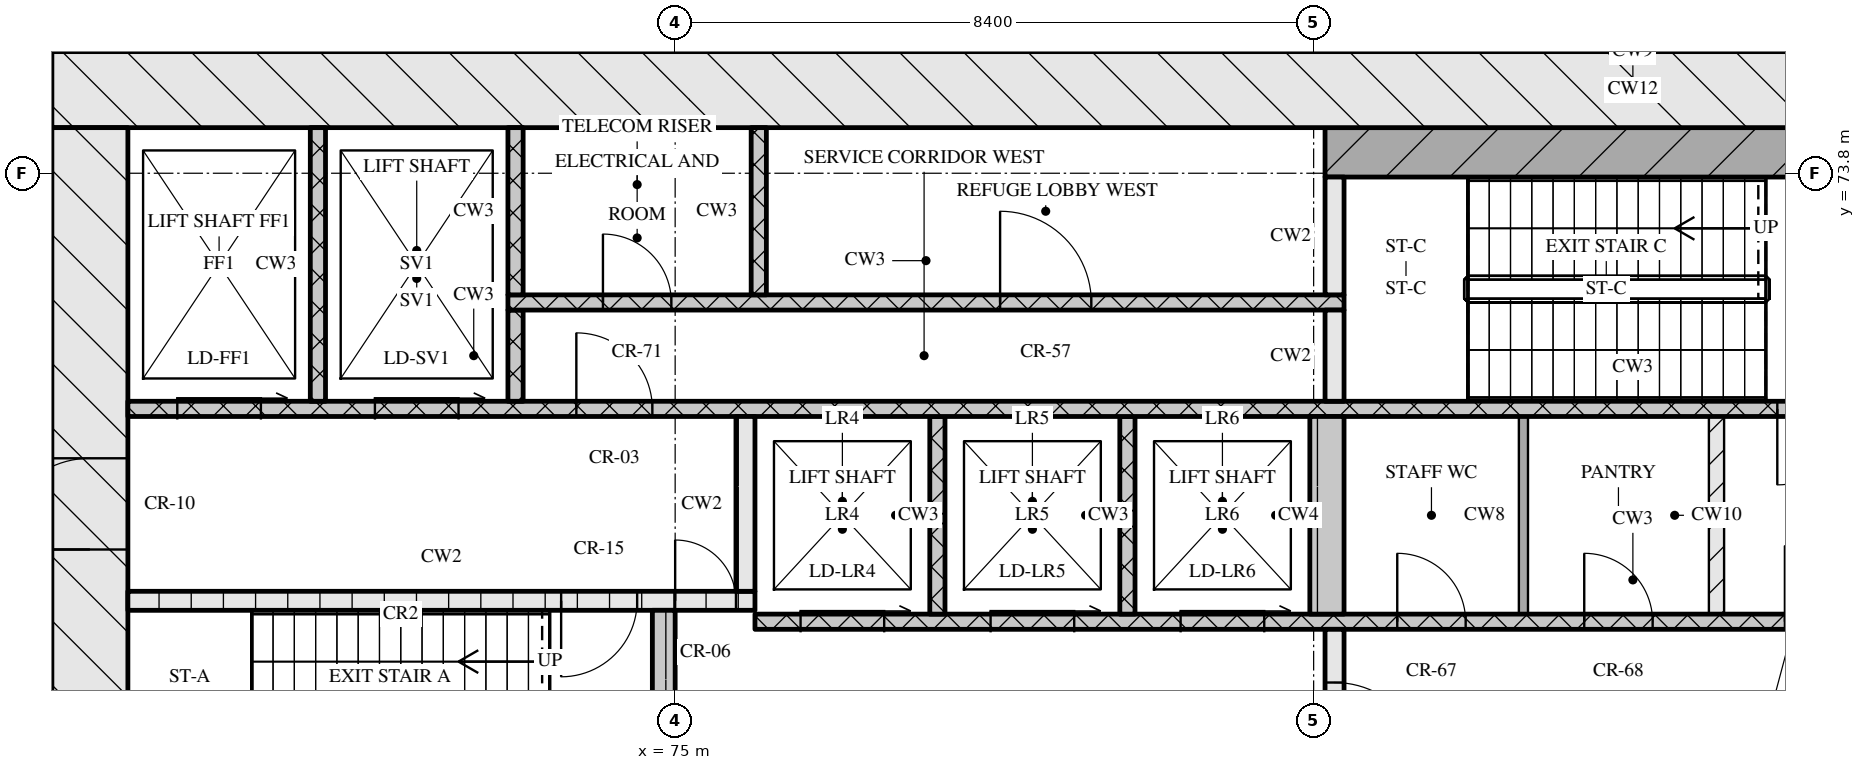
"""IFC4 building model, lengths in metres.
Left out: names, types, materials, properties, quantities, classifications, styles, units other than length and angle.
Written with IfcOpenShell. Run it as: python <this file> out.ifc"""

import sys

from ifc_helpers import new_model, si_unit, direction, frame, frame_2d, origin, place, context, subcontext, project, spatial, rectangle, extrude, element, fill, save


model = new_model("IFC4")
c1 = context("Model", 3, precision=1e-05, world=origin(), true_north=direction((0.0, 1.0)))
c2 = subcontext(c1, "Body", "Model", "MODEL_VIEW")
j1 = project(units=[si_unit("LENGTHUNIT", "METRE"), si_unit("PLANEANGLEUNIT", "RADIAN")], contexts=[c1])
p1 = place(None, origin())
s1 = spatial("IfcSite", under=j1, at=p1, CompositionType="ELEMENT")
p2 = place(p1, origin())
s2 = spatial("IfcBuilding", under=s1, at=p2, CompositionType="ELEMENT")
p3 = place(p2, frame((0.0, 0.0, 84.0)))
s3 = spatial("IfcBuildingStorey", under=s2, at=p3, CompositionType="ELEMENT", Elevation=84.0)
p4 = place(p3, frame((66.8, 74.9, 0.0), z_axis=(0.0, 0.0, 1.0), x_axis=(1.0, 0.0, 0.0)))
e1 = element("IfcWall", 1, at=p4, inside=s3, PredefinedType="SOLIDWALL", context=c2, shape_type="SweptSolid", body=[
    extrude(rectangle(XDim=41.6, YDim=1.0, at=frame_2d((20.8, 0.0))), origin(), (0.0, 0.0, 1.0), 10.97),
])
p5 = place(p3, frame((67.3, 62.4, 0.0), z_axis=(0.0, 0.0, 1.0), x_axis=(0.0, 1.0, 0.0)))
e2 = element("IfcWall", 2, at=p5, inside=s3, PredefinedType="SOLIDWALL", context=c2, shape_type="SweptSolid", body=[
    extrude(rectangle(XDim=12.0, YDim=1.0, at=frame_2d((6.0, 0.0))), origin(), (0.0, 0.0, 1.0), 10.97),
])
p6 = place(p5, frame((6.45, 0.0, 0.0)))
e3 = element("IfcOpeningElement", 3, at=p6, cuts=e2, PredefinedType="OPENING", context=c2, shape_type="SweptSolid", body=[
    extrude(rectangle(XDim=1.2, YDim=2.1, at=frame_2d((0.6, 1.05))), frame((0.0, 0.51, 0.0), z_axis=(0.0, -1.0, 0.0), x_axis=(1.0, 0.0, 0.0)), (0.0, 0.0, 1.0), 1.02),
])
p7 = place(p3, frame((74.85, 65.2, 0.0), z_axis=(0.0, 0.0, 1.0), x_axis=(0.0, 1.0, 0.0)))
e4 = element("IfcWall", 4, at=p7, inside=s3, PredefinedType="SOLIDWALL", context=c2, shape_type="SweptSolid", body=[
    extrude(rectangle(XDim=2.85, YDim=0.3, at=frame_2d((1.425, 0.0))), origin(), (0.0, 0.0, 1.0), 10.97),
])
p8 = place(p3, frame((83.675, 65.2, 0.0), z_axis=(0.0, 0.0, 1.0), x_axis=(0.0, 1.0, 0.0)))
e5 = element("IfcWall", 5, at=p8, inside=s3, PredefinedType="SOLIDWALL", context=c2, shape_type="SweptSolid", body=[
    extrude(rectangle(XDim=2.6, YDim=0.25, at=frame_2d((1.3, 0.0))), origin(), (0.0, 0.0, 1.0), 10.97),
])
p9 = place(p8, frame((0.7, 0.0, 0.0)))
e6 = element("IfcOpeningElement", 6, at=p9, cuts=e5, PredefinedType="OPENING", context=c2, shape_type="SweptSolid", body=[
    extrude(rectangle(XDim=1.2, YDim=2.1, at=frame_2d((0.6, 1.05))), frame((0.0, 0.135, 0.0), z_axis=(0.0, -1.0, 0.0), x_axis=(1.0, 0.0, 0.0)), (0.0, 0.0, 1.0), 0.27),
])
p10 = place(p3, frame((76.05, 67.9, 0.0), z_axis=(0.0, 0.0, 1.0), x_axis=(1.0, 0.0, 0.0)))
e7 = element("IfcWall", 7, at=p10, inside=s3, PredefinedType="SOLIDWALL", context=c2, shape_type="SweptSolid", body=[
    extrude(rectangle(XDim=23.1, YDim=0.2, at=frame_2d((11.55, 0.0))), origin(), (0.0, 0.0, 1.0), 10.97),
])
p11 = place(p10, frame((0.6, 0.0, 0.0)))
e8 = element("IfcOpeningElement", 8, at=p11, cuts=e7, PredefinedType="OPENING", context=c2, shape_type="SweptSolid", body=[
    extrude(rectangle(XDim=1.1, YDim=2.1, at=frame_2d((0.55, 1.05))), frame((0.0, 0.11, 0.0), z_axis=(0.0, -1.0, 0.0), x_axis=(1.0, 0.0, 0.0)), (0.0, 0.0, 1.0), 0.22),
])
p12 = place(p10, frame((3.1, 0.0, 0.0)))
e9 = element("IfcOpeningElement", 9, at=p12, cuts=e7, PredefinedType="OPENING", context=c2, shape_type="SweptSolid", body=[
    extrude(rectangle(XDim=1.1, YDim=2.1, at=frame_2d((0.55, 1.05))), frame((0.0, 0.11, 0.0), z_axis=(0.0, -1.0, 0.0), x_axis=(1.0, 0.0, 0.0)), (0.0, 0.0, 1.0), 0.22),
])
p13 = place(p10, frame((5.6, 0.0, 0.0)))
e10 = element("IfcOpeningElement", 10, at=p13, cuts=e7, PredefinedType="OPENING", context=c2, shape_type="SweptSolid", body=[
    extrude(rectangle(XDim=1.1, YDim=2.1, at=frame_2d((0.55, 1.05))), frame((0.0, 0.11, 0.0), z_axis=(0.0, -1.0, 0.0), x_axis=(1.0, 0.0, 0.0)), (0.0, 0.0, 1.0), 0.22),
])
p14 = place(p10, frame((8.45, 0.0, 0.0)))
e11 = element("IfcOpeningElement", 11, at=p14, cuts=e7, PredefinedType="OPENING", context=c2, shape_type="SweptSolid", body=[
    extrude(rectangle(XDim=0.9, YDim=2.1, at=frame_2d((0.45, 1.05))), frame((0.0, 0.11, 0.0), z_axis=(0.0, -1.0, 0.0), x_axis=(1.0, 0.0, 0.0)), (0.0, 0.0, 1.0), 0.22),
])
p15 = place(p10, frame((10.91, 0.0, 0.0)))
e12 = element("IfcOpeningElement", 12, at=p15, cuts=e7, PredefinedType="OPENING", context=c2, shape_type="SweptSolid", body=[
    extrude(rectangle(XDim=0.9, YDim=2.1, at=frame_2d((0.45, 1.05))), frame((0.0, 0.11, 0.0), z_axis=(0.0, -1.0, 0.0), x_axis=(1.0, 0.0, 0.0)), (0.0, 0.0, 1.0), 0.22),
])
p16 = place(p10, frame((13.55, 0.0, 0.0)))
e13 = element("IfcOpeningElement", 13, at=p16, cuts=e7, PredefinedType="OPENING", context=c2, shape_type="SweptSolid", body=[
    extrude(rectangle(XDim=1.0, YDim=2.1, at=frame_2d((0.5, 1.05))), frame((0.0, 0.11, 0.0), z_axis=(0.0, -1.0, 0.0), x_axis=(1.0, 0.0, 0.0)), (0.0, 0.0, 1.0), 0.22),
])
for number, where, z_axis, x_axis in (
    (14, (78.45, 68.0, 0.0), (0.0, 0.0, 1.0), (0.0, 1.0, 0.0)),
    (15, (80.95, 68.0, 0.0), (0.0, 0.0, 1.0), (0.0, 1.0, 0.0)),
):
    element("IfcWall", number, at=place(p3, frame(where, z_axis=z_axis, x_axis=x_axis)), inside=s3, PredefinedType="SOLIDWALL", context=c2, shape_type="SweptSolid", body=[
        extrude(rectangle(XDim=2.6, YDim=0.2, at=frame_2d((1.3, 0.0))), origin(), (0.0, 0.0, 1.0), 10.97),
    ])
p17 = place(p3, frame((83.575, 68.0, 0.0), z_axis=(0.0, 0.0, 1.0), x_axis=(0.0, 1.0, 0.0)))
e16 = element("IfcWall", 16, at=p17, inside=s3, PredefinedType="SOLIDWALL", context=c2, shape_type="SweptSolid", body=[
    extrude(rectangle(XDim=2.6, YDim=0.45, at=frame_2d((1.3, 0.0))), origin(), (0.0, 0.0, 1.0), 10.97),
])
p18 = place(p3, frame((86.16, 68.0, 0.0), z_axis=(0.0, 0.0, 1.0), x_axis=(0.0, 1.0, 0.0)))
e17 = element("IfcWall", 17, at=p18, inside=s3, PredefinedType="PARTITIONING", context=c2, shape_type="SweptSolid", body=[
    extrude(rectangle(XDim=2.6, YDim=0.12, at=frame_2d((1.3, 0.0))), origin(), (0.0, 0.0, 1.0), 10.97),
])
p19 = place(p3, frame((88.7, 68.0, 0.0), z_axis=(0.0, 0.0, 1.0), x_axis=(0.0, 1.0, 0.0)))
e18 = element("IfcWall", 18, at=p19, inside=s3, PredefinedType="PARTITIONING", context=c2, shape_type="SweptSolid", body=[
    extrude(rectangle(XDim=2.6, YDim=0.2, at=frame_2d((1.3, 0.0))), origin(), (0.0, 0.0, 1.0), 10.97),
])
p20 = place(p3, frame((67.8, 68.175, 0.0), z_axis=(0.0, 0.0, 1.0), x_axis=(1.0, 0.0, 0.0)))
e19 = element("IfcWall", 19, at=p20, inside=s3, PredefinedType="SOLIDWALL", context=c2, shape_type="SweptSolid", body=[
    extrude(rectangle(XDim=8.25, YDim=0.25, at=frame_2d((4.125, 0.0))), origin(), (0.0, 0.0, 1.0), 10.97),
])
p21 = place(p20, frame((5.7, 0.0, 0.0)))
e20 = element("IfcOpeningElement", 20, at=p21, cuts=e19, PredefinedType="OPENING", context=c2, shape_type="SweptSolid", body=[
    extrude(rectangle(XDim=1.0, YDim=2.1, at=frame_2d((0.5, 1.05))), frame((0.0, 0.135, 0.0), z_axis=(0.0, -1.0, 0.0), x_axis=(1.0, 0.0, 0.0)), (0.0, 0.0, 1.0), 0.27),
])
p22 = place(p20, frame((7.2, 0.0, 0.0)))
e21 = element("IfcOpeningElement", 21, at=p22, cuts=e19, PredefinedType="OPENING", context=c2, shape_type="SweptSolid", body=[
    extrude(rectangle(XDim=0.8, YDim=2.1, at=frame_2d((0.4, 1.05))), frame((0.0, 0.135, 0.0), z_axis=(0.0, -1.0, 0.0), x_axis=(1.0, 0.0, 0.0)), (0.0, 0.0, 1.0), 0.27),
])
p23 = place(p3, frame((75.925, 68.3, 0.0), z_axis=(0.0, 0.0, 1.0), x_axis=(0.0, 1.0, 0.0)))
e22 = element("IfcWall", 22, at=p23, inside=s3, PredefinedType="SOLIDWALL", context=c2, shape_type="SweptSolid", body=[
    extrude(rectangle(XDim=2.3, YDim=0.25, at=frame_2d((1.15, 0.0))), origin(), (0.0, 0.0, 1.0), 10.97),
])
p24 = place(p3, frame((67.8, 70.7, 0.0), z_axis=(0.0, 0.0, 1.0), x_axis=(1.0, 0.0, 0.0)))
e23 = element("IfcWall", 23, at=p24, inside=s3, PredefinedType="SOLIDWALL", context=c2, shape_type="SweptSolid", body=[
    extrude(rectangle(XDim=39.6, YDim=0.2, at=frame_2d((19.8, 0.0))), origin(), (0.0, 0.0, 1.0), 10.97),
])
p25 = place(p24, frame((0.65, 0.0, 0.0)))
e24 = element("IfcOpeningElement", 24, at=p25, cuts=e23, PredefinedType="OPENING", context=c2, shape_type="SweptSolid", body=[
    extrude(rectangle(XDim=1.1, YDim=2.1, at=frame_2d((0.55, 1.05))), frame((0.0, 0.11, 0.0), z_axis=(0.0, -1.0, 0.0), x_axis=(1.0, 0.0, 0.0)), (0.0, 0.0, 1.0), 0.22),
])
p26 = place(p24, frame((3.25, 0.0, 0.0)))
e25 = element("IfcOpeningElement", 25, at=p26, cuts=e23, PredefinedType="OPENING", context=c2, shape_type="SweptSolid", body=[
    extrude(rectangle(XDim=1.1, YDim=2.1, at=frame_2d((0.55, 1.05))), frame((0.0, 0.11, 0.0), z_axis=(0.0, -1.0, 0.0), x_axis=(1.0, 0.0, 0.0)), (0.0, 0.0, 1.0), 0.22),
])
p27 = place(p24, frame((5.9, 0.0, 0.0)))
e26 = element("IfcOpeningElement", 26, at=p27, cuts=e23, PredefinedType="OPENING", context=c2, shape_type="SweptSolid", body=[
    extrude(rectangle(XDim=1.0, YDim=2.1, at=frame_2d((0.5, 1.05))), frame((0.0, 0.11, 0.0), z_axis=(0.0, -1.0, 0.0), x_axis=(1.0, 0.0, 0.0)), (0.0, 0.0, 1.0), 0.22),
])
p28 = place(p24, frame((21.7, 0.0, 0.0)))
e27 = element("IfcOpeningElement", 27, at=p28, cuts=e23, PredefinedType="OPENING", context=c2, shape_type="SweptSolid", body=[
    extrude(rectangle(XDim=1.0, YDim=2.1, at=frame_2d((0.5, 1.05))), frame((0.0, 0.11, 0.0), z_axis=(0.0, -1.0, 0.0), x_axis=(1.0, 0.0, 0.0)), (0.0, 0.0, 1.0), 0.22),
])
p29 = place(p24, frame((32.7, 0.0, 0.0)))
e28 = element("IfcOpeningElement", 28, at=p29, cuts=e23, PredefinedType="OPENING", context=c2, shape_type="SweptSolid", body=[
    extrude(rectangle(XDim=1.0, YDim=2.1, at=frame_2d((0.5, 1.05))), frame((0.0, 0.11, 0.0), z_axis=(0.0, -1.0, 0.0), x_axis=(1.0, 0.0, 0.0)), (0.0, 0.0, 1.0), 0.22),
])
p30 = place(p24, frame((35.25, 0.0, 0.0)))
e29 = element("IfcOpeningElement", 29, at=p30, cuts=e23, PredefinedType="OPENING", context=c2, shape_type="SweptSolid", body=[
    extrude(rectangle(XDim=1.1, YDim=2.1, at=frame_2d((0.55, 1.05))), frame((0.0, 0.11, 0.0), z_axis=(0.0, -1.0, 0.0), x_axis=(1.0, 0.0, 0.0)), (0.0, 0.0, 1.0), 0.22),
])
p31 = place(p24, frame((37.85, 0.0, 0.0)))
e30 = element("IfcOpeningElement", 30, at=p31, cuts=e23, PredefinedType="OPENING", context=c2, shape_type="SweptSolid", body=[
    extrude(rectangle(XDim=1.1, YDim=2.1, at=frame_2d((0.55, 1.05))), frame((0.0, 0.11, 0.0), z_axis=(0.0, -1.0, 0.0), x_axis=(1.0, 0.0, 0.0)), (0.0, 0.0, 1.0), 0.22),
])
p32 = place(p3, frame((70.3, 70.8, 0.0), z_axis=(0.0, 0.0, 1.0), x_axis=(0.0, 1.0, 0.0)))
e31 = element("IfcWall", 31, at=p32, inside=s3, PredefinedType="SOLIDWALL", context=c2, shape_type="SweptSolid", body=[
    extrude(rectangle(XDim=3.6, YDim=0.2, at=frame_2d((1.8, 0.0))), origin(), (0.0, 0.0, 1.0), 10.97),
])
p33 = place(p3, frame((72.9, 70.8, 0.0), z_axis=(0.0, 0.0, 1.0), x_axis=(0.0, 1.0, 0.0)))
e32 = element("IfcWall", 32, at=p33, inside=s3, PredefinedType="SOLIDWALL", context=c2, shape_type="SweptSolid", body=[
    extrude(rectangle(XDim=1.2, YDim=0.2, at=frame_2d((0.6, 0.0))), origin(), (0.0, 0.0, 1.0), 10.97),
])
p34 = place(p3, frame((83.675, 70.8, 0.0), z_axis=(0.0, 0.0, 1.0), x_axis=(0.0, 1.0, 0.0)))
e33 = element("IfcWall", 33, at=p34, inside=s3, PredefinedType="SOLIDWALL", context=c2, shape_type="SweptSolid", body=[
    extrude(rectangle(XDim=1.2, YDim=0.25, at=frame_2d((0.6, 0.0))), origin(), (0.0, 0.0, 1.0), 10.97),
])
p35 = place(p3, frame((72.8, 72.1, 0.0), z_axis=(0.0, 0.0, 1.0), x_axis=(1.0, 0.0, 0.0)))
e34 = element("IfcWall", 34, at=p35, inside=s3, PredefinedType="SOLIDWALL", context=c2, shape_type="SweptSolid", body=[
    extrude(rectangle(XDim=11.0, YDim=0.2, at=frame_2d((5.5, 0.0))), origin(), (0.0, 0.0, 1.0), 10.97),
])
p36 = place(p35, frame((1.25, 0.0, 0.0)))
e35 = element("IfcOpeningElement", 35, at=p36, cuts=e34, PredefinedType="OPENING", context=c2, shape_type="SweptSolid", body=[
    extrude(rectangle(XDim=0.9, YDim=2.1, at=frame_2d((0.45, 1.05))), frame((0.0, 0.11, 0.0), z_axis=(0.0, -1.0, 0.0), x_axis=(1.0, 0.0, 0.0)), (0.0, 0.0, 1.0), 0.22),
])
p37 = place(p35, frame((6.475, 0.0, 0.0)))
e36 = element("IfcOpeningElement", 36, at=p37, cuts=e34, PredefinedType="OPENING", context=c2, shape_type="SweptSolid", body=[
    extrude(rectangle(XDim=1.2, YDim=2.1, at=frame_2d((0.6, 1.05))), frame((0.0, 0.11, 0.0), z_axis=(0.0, -1.0, 0.0), x_axis=(1.0, 0.0, 0.0)), (0.0, 0.0, 1.0), 0.22),
])
for number, where, z_axis, x_axis in (
    (37, (72.9, 72.2, 0.0), (0.0, 0.0, 1.0), (0.0, 1.0, 0.0)),
    (38, (76.1, 72.2, 0.0), (0.0, 0.0, 1.0), (0.0, 1.0, 0.0)),
):
    element("IfcWall", number, at=place(p3, frame(where, z_axis=z_axis, x_axis=x_axis)), inside=s3, PredefinedType="SOLIDWALL", context=c2, shape_type="SweptSolid", body=[
        extrude(rectangle(XDim=2.2, YDim=0.2, at=frame_2d((1.1, 0.0))), origin(), (0.0, 0.0, 1.0), 10.97),
    ])
p38 = place(p3, frame((83.675, 72.2, 0.0), z_axis=(0.0, 0.0, 1.0), x_axis=(0.0, 1.0, 0.0)))
e39 = element("IfcWall", 39, at=p38, inside=s3, PredefinedType="SOLIDWALL", context=c2, shape_type="SweptSolid", body=[
    extrude(rectangle(XDim=1.55, YDim=0.25, at=frame_2d((0.775, 0.0))), origin(), (0.0, 0.0, 1.0), 10.97),
])
p39 = place(p3, frame((83.55, 74.075, 0.0), z_axis=(0.0, 0.0, 1.0), x_axis=(1.0, 0.0, 0.0)))
e40 = element("IfcWall", 40, at=p39, inside=s3, PredefinedType="SOLIDWALL", context=c2, shape_type="SweptSolid", body=[
    extrude(rectangle(XDim=8.1, YDim=0.65, at=frame_2d((4.05, 0.0))), origin(), (0.0, 0.0, 1.0), 10.97),
])
p40 = place(p9, origin())
e41 = element("IfcDoor", 41, at=p40, inside=s3, OperationType="SINGLE_SWING_RIGHT", PredefinedType="DOOR", context=c2, shape_type="SweptSolid", body=[
    extrude(rectangle(XDim=1.2, YDim=2.1, at=frame_2d((0.6, 1.05))), frame((0.0, 0.025, 0.0), z_axis=(0.0, -1.0, 0.0), x_axis=(1.0, 0.0, 0.0)), (0.0, 0.0, 1.0), 0.05),
])
fill(e6, e41)
p41 = place(p11, origin())
e42 = element("IfcDoor", 42, at=p41, inside=s3, OperationType="SLIDING_TO_RIGHT", PredefinedType="DOOR", context=c2, shape_type="SweptSolid", body=[
    extrude(rectangle(XDim=1.1, YDim=2.1, at=frame_2d((0.55, 1.05))), frame((0.0, 0.025, 0.0), z_axis=(0.0, -1.0, 0.0), x_axis=(1.0, 0.0, 0.0)), (0.0, 0.0, 1.0), 0.05),
])
fill(e8, e42)
p42 = place(p12, origin())
e43 = element("IfcDoor", 43, at=p42, inside=s3, OperationType="SLIDING_TO_RIGHT", PredefinedType="DOOR", context=c2, shape_type="SweptSolid", body=[
    extrude(rectangle(XDim=1.1, YDim=2.1, at=frame_2d((0.55, 1.05))), frame((0.0, 0.025, 0.0), z_axis=(0.0, -1.0, 0.0), x_axis=(1.0, 0.0, 0.0)), (0.0, 0.0, 1.0), 0.05),
])
fill(e9, e43)
p43 = place(p13, origin())
e44 = element("IfcDoor", 44, at=p43, inside=s3, OperationType="SLIDING_TO_RIGHT", PredefinedType="DOOR", context=c2, shape_type="SweptSolid", body=[
    extrude(rectangle(XDim=1.1, YDim=2.1, at=frame_2d((0.55, 1.05))), frame((0.0, 0.025, 0.0), z_axis=(0.0, -1.0, 0.0), x_axis=(1.0, 0.0, 0.0)), (0.0, 0.0, 1.0), 0.05),
])
fill(e10, e44)
p44 = place(p14, origin())
e45 = element("IfcDoor", 45, at=p44, inside=s3, OperationType="SINGLE_SWING_LEFT", PredefinedType="DOOR", context=c2, shape_type="SweptSolid", body=[
    extrude(rectangle(XDim=0.9, YDim=2.1, at=frame_2d((0.45, 1.05))), frame((0.0, 0.025, 0.0), z_axis=(0.0, -1.0, 0.0), x_axis=(1.0, 0.0, 0.0)), (0.0, 0.0, 1.0), 0.05),
])
fill(e11, e45)
p45 = place(p15, origin())
e46 = element("IfcDoor", 46, at=p45, inside=s3, OperationType="SINGLE_SWING_LEFT", PredefinedType="DOOR", context=c2, shape_type="SweptSolid", body=[
    extrude(rectangle(XDim=0.9, YDim=2.1, at=frame_2d((0.45, 1.05))), frame((0.0, 0.025, 0.0), z_axis=(0.0, -1.0, 0.0), x_axis=(1.0, 0.0, 0.0)), (0.0, 0.0, 1.0), 0.05),
])
fill(e12, e46)
p46 = place(p21, origin())
e47 = element("IfcDoor", 47, at=p46, inside=s3, OperationType="SINGLE_SWING_RIGHT", PredefinedType="DOOR", context=c2, shape_type="SweptSolid", body=[
    extrude(rectangle(XDim=1.0, YDim=2.1, at=frame_2d((0.5, 1.05))), frame((0.0, 0.025, 0.0), z_axis=(0.0, -1.0, 0.0), x_axis=(1.0, 0.0, 0.0)), (0.0, 0.0, 1.0), 0.05),
])
fill(e20, e47)
p47 = place(p22, origin())
e48 = element("IfcDoor", 48, at=p47, inside=s3, OperationType="SINGLE_SWING_LEFT", PredefinedType="DOOR", context=c2, shape_type="SweptSolid", body=[
    extrude(rectangle(XDim=0.8, YDim=2.1, at=frame_2d((0.4, 1.05))), frame((0.0, 0.025, 0.0), z_axis=(0.0, -1.0, 0.0), x_axis=(1.0, 0.0, 0.0)), (0.0, 0.0, 1.0), 0.05),
])
fill(e21, e48)
p48 = place(p6, origin())
e49 = element("IfcDoor", 49, at=p48, inside=s3, OperationType="SINGLE_SWING_LEFT", PredefinedType="DOOR", context=c2, shape_type="SweptSolid", body=[
    extrude(rectangle(XDim=1.2, YDim=2.1, at=frame_2d((0.6, 1.05))), frame((0.0, 0.025, 0.0), z_axis=(0.0, -1.0, 0.0), x_axis=(1.0, 0.0, 0.0)), (0.0, 0.0, 1.0), 0.05),
])
fill(e3, e49)
p49 = place(p25, origin())
e50 = element("IfcDoor", 50, at=p49, inside=s3, OperationType="SLIDING_TO_RIGHT", PredefinedType="DOOR", context=c2, shape_type="SweptSolid", body=[
    extrude(rectangle(XDim=1.1, YDim=2.1, at=frame_2d((0.55, 1.05))), frame((0.0, 0.025, 0.0), z_axis=(0.0, -1.0, 0.0), x_axis=(1.0, 0.0, 0.0)), (0.0, 0.0, 1.0), 0.05),
])
fill(e24, e50)
p50 = place(p26, origin())
e51 = element("IfcDoor", 51, at=p50, inside=s3, OperationType="SLIDING_TO_RIGHT", PredefinedType="DOOR", context=c2, shape_type="SweptSolid", body=[
    extrude(rectangle(XDim=1.1, YDim=2.1, at=frame_2d((0.55, 1.05))), frame((0.0, 0.025, 0.0), z_axis=(0.0, -1.0, 0.0), x_axis=(1.0, 0.0, 0.0)), (0.0, 0.0, 1.0), 0.05),
])
fill(e25, e51)
p51 = place(p27, origin())
e52 = element("IfcDoor", 52, at=p51, inside=s3, OperationType="SINGLE_SWING_LEFT", PredefinedType="DOOR", context=c2, shape_type="SweptSolid", body=[
    extrude(rectangle(XDim=1.0, YDim=2.1, at=frame_2d((0.5, 1.05))), frame((0.0, 0.025, 0.0), z_axis=(0.0, -1.0, 0.0), x_axis=(1.0, 0.0, 0.0)), (0.0, 0.0, 1.0), 0.05),
])
fill(e26, e52)
p52 = place(p28, origin())
e53 = element("IfcDoor", 53, at=p52, inside=s3, OperationType="SINGLE_SWING_RIGHT", PredefinedType="DOOR", context=c2, shape_type="SweptSolid", body=[
    extrude(rectangle(XDim=1.0, YDim=2.1, at=frame_2d((0.5, 1.05))), frame((0.0, 0.025, 0.0), z_axis=(0.0, -1.0, 0.0), x_axis=(1.0, 0.0, 0.0)), (0.0, 0.0, 1.0), 0.05),
])
fill(e27, e53)
p53 = place(p36, origin())
e54 = element("IfcDoor", 54, at=p53, inside=s3, OperationType="SINGLE_SWING_LEFT", PredefinedType="DOOR", context=c2, shape_type="SweptSolid", body=[
    extrude(rectangle(XDim=0.9, YDim=2.1, at=frame_2d((0.45, 1.05))), frame((0.0, 0.025, 0.0), z_axis=(0.0, -1.0, 0.0), x_axis=(1.0, 0.0, 0.0)), (0.0, 0.0, 1.0), 0.05),
])
fill(e35, e54)
p54 = place(p37, origin())
e55 = element("IfcDoor", 55, at=p54, inside=s3, OperationType="SINGLE_SWING_LEFT", PredefinedType="DOOR", context=c2, shape_type="SweptSolid", body=[
    extrude(rectangle(XDim=1.2, YDim=2.1, at=frame_2d((0.6, 1.05))), frame((0.0, 0.025, 0.0), z_axis=(0.0, -1.0, 0.0), x_axis=(1.0, 0.0, 0.0)), (0.0, 0.0, 1.0), 0.05),
])
fill(e36, e55)
save(model, sys.argv[1])
